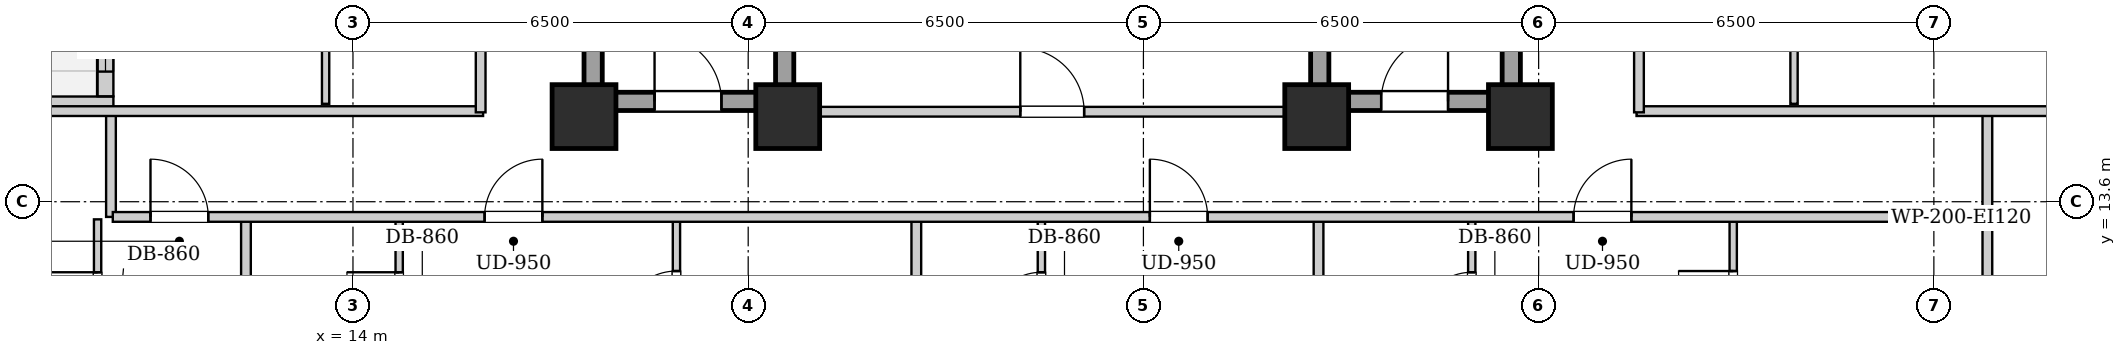
"""IFC4 building model, lengths in metres.
Left out: names, types, materials, properties, quantities, classifications, styles, units other than length and angle.
Written with IfcOpenShell. Run it as: python <this file> out.ifc"""

import sys

from ifc_helpers import new_model, si_unit, direction, frame, frame_2d, origin, origin_2d, place, context, subcontext, project, spatial, rectangle, extrude, element, fill, save


model = new_model("IFC4")
c1 = context("Model", 3, precision=1e-05, world=origin(), true_north=direction((0.0, 1.0)))
c2 = subcontext(c1, "Body", "Model", "MODEL_VIEW")
j1 = project(units=[si_unit("LENGTHUNIT", "METRE"), si_unit("PLANEANGLEUNIT", "RADIAN")], contexts=[c1])
p1 = place(None, origin())
s1 = spatial("IfcSite", under=j1, at=p1, CompositionType="ELEMENT")
p2 = place(p1, origin())
s2 = spatial("IfcBuilding", under=s1, at=p2, CompositionType="ELEMENT")
p3 = place(p2, frame((0.0, 0.0, 91.1)))
s3 = spatial("IfcBuildingStorey", under=s2, at=p3, CompositionType="ELEMENT", Elevation=91.1)
for number, where, z_axis, x_axis in (
    (1, (17.8, 15.0, 0.0), (0.0, 0.0, 1.0), (1.0, 0.0, 0.0)),
    (2, (21.15, 15.0, 0.0), (0.0, 0.0, 1.0), (1.0, 0.0, 0.0)),
    (3, (29.85, 15.0, 0.0), (0.0, 0.0, 1.0), (1.0, 0.0, 0.0)),
    (4, (33.2, 15.0, 0.0), (0.0, 0.0, 1.0), (1.0, 0.0, 0.0)),
):
    element("IfcColumn", number, at=place(p3, frame(where, z_axis=z_axis, x_axis=x_axis)), inside=s3, PredefinedType="COLUMN", context=c2, shape_type="SweptSolid", body=[
        extrude(rectangle(XDim=1.05, YDim=1.05, at=origin_2d()), origin(), (0.0, 0.0, 1.0), 3.2),
    ])
p4 = place(p3, frame((7.66, 15.2, 0.0), z_axis=(0.0, 0.0, 1.0), x_axis=(1.0, 0.0, 0.0)))
e5 = element("IfcWall", 5, at=p4, inside=s3, PredefinedType="SOLIDWALL", context=c2, shape_type="SweptSolid", body=[
    extrude(rectangle(XDim=2.4, YDim=0.26, at=frame_2d((1.2, 0.0))), origin(), (0.0, 0.0, 1.0), 2.94),
])
p5 = place(p3, frame((9.93, 15.334, 0.0), z_axis=(0.0, 0.0, 1.0), x_axis=(0.0, 1.0, 0.0)))
e6 = element("IfcWall", 6, at=p5, inside=s3, PredefinedType="SOLIDWALL", context=c2, shape_type="SweptSolid", body=[
    extrude(rectangle(XDim=3.932, YDim=0.26, at=frame_2d((1.966, 0.0))), origin(), (0.0, 0.0, 1.0), 2.94),
])
p6 = place(p5, frame((1.416, 0.0, 0.0)))
e7 = element("IfcOpeningElement", 7, at=p6, cuts=e6, PredefinedType="OPENING", context=c2, shape_type="SweptSolid", body=[
    extrude(rectangle(XDim=1.1, YDim=2.0, at=frame_2d((0.55, 1.0))), frame((0.0, 0.14, 0.0), z_axis=(0.0, -1.0, 0.0), x_axis=(1.0, 0.0, 0.0)), (0.0, 0.0, 1.0), 0.28),
])
p7 = place(p5, frame((0.406, 0.0, 0.55)))
e8 = element("IfcOpeningElement", 8, at=p7, cuts=e6, PredefinedType="OPENING", context=c2, shape_type="SweptSolid", body=[
    extrude(rectangle(XDim=0.85, YDim=1.2, at=frame_2d((0.425, 0.6))), frame((0.0, 0.14, 0.0), z_axis=(0.0, -1.0, 0.0), x_axis=(1.0, 0.0, 0.0)), (0.0, 0.0, 1.0), 0.28),
])
for number, where, z_axis, x_axis in (
    (9, (17.95, 15.1, 0.0), (0.0, 0.0, 1.0), (0.0, 1.0, 0.0)),
    (10, (21.1, 15.1, 0.0), (0.0, 0.0, 1.0), (0.0, 1.0, 0.0)),
):
    element("IfcWall", number, at=place(p3, frame(where, z_axis=z_axis, x_axis=x_axis)), inside=s3, PredefinedType="SHEAR", context=c2, shape_type="SweptSolid", body=[
        extrude(rectangle(XDim=9.0, YDim=0.3, at=frame_2d((4.5, 0.0))), origin(), (0.0, 0.0, 1.0), 2.94),
    ])
p8 = place(p3, frame((18.1, 15.25, 0.0), z_axis=(0.0, 0.0, 1.0), x_axis=(1.0, 0.0, 0.0)))
e11 = element("IfcWall", 11, at=p8, inside=s3, PredefinedType="SHEAR", context=c2, shape_type="SweptSolid", body=[
    extrude(rectangle(XDim=2.85, YDim=0.3, at=frame_2d((1.425, 0.0))), origin(), (0.0, 0.0, 1.0), 2.94),
])
p9 = place(p8, frame((0.86, 0.0, 0.0)))
e12 = element("IfcOpeningElement", 12, at=p9, cuts=e11, PredefinedType="OPENING", context=c2, shape_type="SweptSolid", body=[
    extrude(rectangle(XDim=1.1, YDim=2.05, at=frame_2d((0.55, 1.025))), frame((0.0, 0.16, 0.0), z_axis=(0.0, -1.0, 0.0), x_axis=(1.0, 0.0, 0.0)), (0.0, 0.0, 1.0), 0.32),
])
for number, where, z_axis, x_axis in (
    (13, (29.9, 15.1, 0.0), (0.0, 0.0, 1.0), (0.0, 1.0, 0.0)),
    (14, (33.05, 15.1, 0.0), (0.0, 0.0, 1.0), (0.0, 1.0, 0.0)),
):
    element("IfcWall", number, at=place(p3, frame(where, z_axis=z_axis, x_axis=x_axis)), inside=s3, PredefinedType="SHEAR", context=c2, shape_type="SweptSolid", body=[
        extrude(rectangle(XDim=9.0, YDim=0.3, at=frame_2d((4.5, 0.0))), origin(), (0.0, 0.0, 1.0), 2.94),
    ])
p10 = place(p3, frame((30.05, 15.25, 0.0), z_axis=(0.0, 0.0, 1.0), x_axis=(1.0, 0.0, 0.0)))
e15 = element("IfcWall", 15, at=p10, inside=s3, PredefinedType="SHEAR", context=c2, shape_type="SweptSolid", body=[
    extrude(rectangle(XDim=2.85, YDim=0.3, at=frame_2d((1.425, 0.0))), origin(), (0.0, 0.0, 1.0), 2.94),
])
p11 = place(p10, frame((0.86, 0.0, 0.0)))
e16 = element("IfcOpeningElement", 16, at=p11, cuts=e15, PredefinedType="OPENING", context=c2, shape_type="SweptSolid", body=[
    extrude(rectangle(XDim=1.1, YDim=2.05, at=frame_2d((0.55, 1.025))), frame((0.0, 0.16, 0.0), z_axis=(0.0, -1.0, 0.0), x_axis=(1.0, 0.0, 0.0)), (0.0, 0.0, 1.0), 0.32),
])
p12 = place(p3, frame((21.25, 15.08, 0.0), z_axis=(0.0, 0.0, 1.0), x_axis=(1.0, 0.0, 0.0)))
e17 = element("IfcWall", 17, at=p12, inside=s3, PredefinedType="PARTITIONING", context=c2, shape_type="SweptSolid", body=[
    extrude(rectangle(XDim=8.5, YDim=0.16, at=frame_2d((4.25, 0.0))), origin(), (0.0, 0.0, 1.0), 2.309),
])
p13 = place(p12, frame((3.725, 0.0, 0.0)))
e18 = element("IfcOpeningElement", 18, at=p13, cuts=e17, PredefinedType="OPENING", context=c2, shape_type="SweptSolid", body=[
    extrude(rectangle(XDim=1.05, YDim=2.05, at=frame_2d((0.525, 1.025))), frame((0.0, 0.09, 0.0), z_axis=(0.0, -1.0, 0.0), x_axis=(1.0, 0.0, 0.0)), (0.0, 0.0, 1.0), 0.18),
])
for number, where, z_axis, x_axis in (
    (19, (10.02, 13.35, 0.0), (0.0, 0.0, 1.0), (0.0, 1.0, 0.0)),
    (20, (40.88, 13.35, 0.0), (0.0, 0.0, 1.0), (0.0, 1.0, 0.0)),
):
    element("IfcWall", number, at=place(p3, frame(where, z_axis=z_axis, x_axis=x_axis)), inside=s3, PredefinedType="PARTITIONING", context=c2, shape_type="SweptSolid", body=[
        extrude(rectangle(XDim=1.74, YDim=0.16, at=frame_2d((0.87, 0.0))), origin(), (0.0, 0.0, 1.0), 2.94),
    ])
p14 = place(p3, frame((7.78, 15.09, 0.0), z_axis=(0.0, 0.0, 1.0), x_axis=(1.0, 0.0, 0.0)))
e21 = element("IfcWall", 21, at=p14, inside=s3, PredefinedType="PARTITIONING", context=c2, shape_type="SweptSolid", body=[
    extrude(rectangle(XDim=8.36, YDim=0.16, at=frame_2d((4.18, 0.0))), origin(), (0.0, 0.0, 1.0), 2.309),
])
p15 = place(p3, frame((35.11, 15.09, 0.0), z_axis=(0.0, 0.0, 1.0), x_axis=(1.0, 0.0, 0.0)))
e22 = element("IfcWall", 22, at=p15, inside=s3, PredefinedType="PARTITIONING", context=c2, shape_type="SweptSolid", body=[
    extrude(rectangle(XDim=8.01, YDim=0.16, at=frame_2d((4.005, 0.0))), origin(), (0.0, 0.0, 1.0), 2.309),
])
p16 = place(p3, frame((9.8, 10.71, 0.0), z_axis=(0.0, 0.0, 1.0), x_axis=(0.0, 1.0, 0.0)))
e23 = element("IfcWall", 23, at=p16, inside=s3, PredefinedType="PARTITIONING", context=c2, shape_type="SweptSolid", body=[
    extrude(rectangle(XDim=2.6, YDim=0.12, at=frame_2d((1.3, 0.0))), origin(), (0.0, 0.0, 1.0), 2.94),
])
p17 = place(p16, frame((0.87, 0.0, 0.0)))
e24 = element("IfcOpeningElement", 24, at=p17, cuts=e23, PredefinedType="OPENING", context=c2, shape_type="SweptSolid", body=[
    extrude(rectangle(XDim=0.86, YDim=2.05, at=frame_2d((0.43, 1.025))), frame((0.0, 0.07, 0.0), z_axis=(0.0, -1.0, 0.0), x_axis=(1.0, 0.0, 0.0)), (0.0, 0.0, 1.0), 0.14),
])
p18 = place(p3, frame((12.24, 2.26, 0.0), z_axis=(0.0, 0.0, 1.0), x_axis=(0.0, 1.0, 0.0)))
e25 = element("IfcWall", 25, at=p18, inside=s3, PredefinedType="PARTITIONING", context=c2, shape_type="SweptSolid", body=[
    extrude(rectangle(XDim=11.05, YDim=0.16, at=frame_2d((5.525, 0.0))), origin(), (0.0, 0.0, 1.0), 2.94),
])
p19 = place(p3, frame((14.76, 10.71, 0.0), z_axis=(0.0, 0.0, 1.0), x_axis=(0.0, 1.0, 0.0)))
e26 = element("IfcWall", 26, at=p19, inside=s3, PredefinedType="PARTITIONING", context=c2, shape_type="SweptSolid", body=[
    extrude(rectangle(XDim=2.6, YDim=0.12, at=frame_2d((1.3, 0.0))), origin(), (0.0, 0.0, 1.0), 2.94),
])
p20 = place(p19, frame((0.87, 0.0, 0.0)))
e27 = element("IfcOpeningElement", 27, at=p20, cuts=e26, PredefinedType="OPENING", context=c2, shape_type="SweptSolid", body=[
    extrude(rectangle(XDim=0.86, YDim=2.05, at=frame_2d((0.43, 1.025))), frame((0.0, 0.07, 0.0), z_axis=(0.0, -1.0, 0.0), x_axis=(1.0, 0.0, 0.0)), (0.0, 0.0, 1.0), 0.14),
])
p21 = place(p3, frame((19.32, 10.71, 0.0), z_axis=(0.0, 0.0, 1.0), x_axis=(0.0, 1.0, 0.0)))
e28 = element("IfcWall", 28, at=p21, inside=s3, PredefinedType="PARTITIONING", context=c2, shape_type="SweptSolid", body=[
    extrude(rectangle(XDim=2.6, YDim=0.12, at=frame_2d((1.3, 0.0))), origin(), (0.0, 0.0, 1.0), 2.94),
])
p22 = place(p21, frame((0.85, 0.0, 0.0)))
e29 = element("IfcOpeningElement", 29, at=p22, cuts=e28, PredefinedType="OPENING", context=c2, shape_type="SweptSolid", body=[
    extrude(rectangle(XDim=0.9, YDim=2.05, at=frame_2d((0.45, 1.025))), frame((0.0, 0.07, 0.0), z_axis=(0.0, -1.0, 0.0), x_axis=(1.0, 0.0, 0.0)), (0.0, 0.0, 1.0), 0.14),
])
p23 = place(p3, frame((23.265, 0.28, 0.0), z_axis=(0.0, 0.0, 1.0), x_axis=(0.0, 1.0, 0.0)))
e30 = element("IfcWall", 30, at=p23, inside=s3, PredefinedType="PARTITIONING", context=c2, shape_type="SweptSolid", body=[
    extrude(rectangle(XDim=13.03, YDim=0.16, at=frame_2d((6.515, 0.0))), origin(), (0.0, 0.0, 1.0), 2.94),
])
p24 = place(p3, frame((25.322, 10.71, 0.0), z_axis=(0.0, 0.0, 1.0), x_axis=(0.0, 1.0, 0.0)))
e31 = element("IfcWall", 31, at=p24, inside=s3, PredefinedType="PARTITIONING", context=c2, shape_type="SweptSolid", body=[
    extrude(rectangle(XDim=2.6, YDim=0.12, at=frame_2d((1.3, 0.0))), origin(), (0.0, 0.0, 1.0), 2.94),
])
p25 = place(p24, frame((0.87, 0.0, 0.0)))
e32 = element("IfcOpeningElement", 32, at=p25, cuts=e31, PredefinedType="OPENING", context=c2, shape_type="SweptSolid", body=[
    extrude(rectangle(XDim=0.86, YDim=2.05, at=frame_2d((0.43, 1.025))), frame((0.0, 0.07, 0.0), z_axis=(0.0, -1.0, 0.0), x_axis=(1.0, 0.0, 0.0)), (0.0, 0.0, 1.0), 0.14),
])
p26 = place(p3, frame((40.88, 10.65, 0.0), z_axis=(0.0, 0.0, 1.0), x_axis=(0.0, 1.0, 0.0)))
e33 = element("IfcWall", 33, at=p26, inside=s3, PredefinedType="PARTITIONING", context=c2, shape_type="SweptSolid", body=[
    extrude(rectangle(XDim=2.66, YDim=0.16, at=frame_2d((1.33, 0.0))), origin(), (0.0, 0.0, 1.0), 2.94),
])
p27 = place(p3, frame((29.88, 0.28, 0.0), z_axis=(0.0, 0.0, 1.0), x_axis=(0.0, 1.0, 0.0)))
e34 = element("IfcWall", 34, at=p27, inside=s3, PredefinedType="PARTITIONING", context=c2, shape_type="SweptSolid", body=[
    extrude(rectangle(XDim=13.03, YDim=0.16, at=frame_2d((6.515, 0.0))), origin(), (0.0, 0.0, 1.0), 2.94),
])
p28 = place(p3, frame((32.4, 10.71, 0.0), z_axis=(0.0, 0.0, 1.0), x_axis=(0.0, 1.0, 0.0)))
e35 = element("IfcWall", 35, at=p28, inside=s3, PredefinedType="PARTITIONING", context=c2, shape_type="SweptSolid", body=[
    extrude(rectangle(XDim=2.6, YDim=0.12, at=frame_2d((1.3, 0.0))), origin(), (0.0, 0.0, 1.0), 2.94),
])
p29 = place(p28, frame((0.87, 0.0, 0.0)))
e36 = element("IfcOpeningElement", 36, at=p29, cuts=e35, PredefinedType="OPENING", context=c2, shape_type="SweptSolid", body=[
    extrude(rectangle(XDim=0.86, YDim=2.05, at=frame_2d((0.43, 1.025))), frame((0.0, 0.07, 0.0), z_axis=(0.0, -1.0, 0.0), x_axis=(1.0, 0.0, 0.0)), (0.0, 0.0, 1.0), 0.14),
])
p30 = place(p3, frame((36.7, 10.71, 0.0), z_axis=(0.0, 0.0, 1.0), x_axis=(0.0, 1.0, 0.0)))
e37 = element("IfcWall", 37, at=p30, inside=s3, PredefinedType="PARTITIONING", context=c2, shape_type="SweptSolid", body=[
    extrude(rectangle(XDim=2.6, YDim=0.12, at=frame_2d((1.3, 0.0))), origin(), (0.0, 0.0, 1.0), 2.94),
])
p31 = place(p30, frame((0.85, 0.0, 0.0)))
e38 = element("IfcOpeningElement", 38, at=p31, cuts=e37, PredefinedType="OPENING", context=c2, shape_type="SweptSolid", body=[
    extrude(rectangle(XDim=0.9, YDim=2.05, at=frame_2d((0.45, 1.025))), frame((0.0, 0.07, 0.0), z_axis=(0.0, -1.0, 0.0), x_axis=(1.0, 0.0, 0.0)), (0.0, 0.0, 1.0), 0.14),
])
for number, where, z_axis, x_axis in (
    (39, (13.55, 15.21, 0.0), (0.0, 0.0, 1.0), (0.0, 1.0, 0.0)),
    (40, (37.7, 15.21, 0.0), (0.0, 0.0, 1.0), (0.0, 1.0, 0.0)),
):
    element("IfcWall", number, at=place(p3, frame(where, z_axis=z_axis, x_axis=x_axis)), inside=s3, PredefinedType="PARTITIONING", context=c2, shape_type="SweptSolid", body=[
        extrude(rectangle(XDim=1.85, YDim=0.12, at=frame_2d((0.925, 0.0))), origin(), (0.0, 0.0, 1.0), 2.94),
    ])
p32 = place(p3, frame((10.05, 13.35, 0.0), z_axis=(0.0, 0.0, 1.0), x_axis=(1.0, 0.0, 0.0)))
e41 = element("IfcWall", 41, at=p32, inside=s3, PredefinedType="PARTITIONING", context=c2, shape_type="SweptSolid", body=[
    extrude(rectangle(XDim=30.8, YDim=0.16, at=frame_2d((15.4, 0.0))), origin(), (0.0, 0.0, 1.0), 2.94),
])
p33 = place(p32, frame((0.62, 0.0, 0.0)))
e42 = element("IfcOpeningElement", 42, at=p33, cuts=e41, PredefinedType="OPENING", context=c2, shape_type="SweptSolid", body=[
    extrude(rectangle(XDim=0.95, YDim=2.1, at=frame_2d((0.475, 1.05))), frame((0.0, 0.09, 0.0), z_axis=(0.0, -1.0, 0.0), x_axis=(1.0, 0.0, 0.0)), (0.0, 0.0, 1.0), 0.18),
])
p34 = place(p32, frame((6.115, 0.0, 0.0)))
e43 = element("IfcOpeningElement", 43, at=p34, cuts=e41, PredefinedType="OPENING", context=c2, shape_type="SweptSolid", body=[
    extrude(rectangle(XDim=0.95, YDim=2.1, at=frame_2d((0.475, 1.05))), frame((0.0, 0.09, 0.0), z_axis=(0.0, -1.0, 0.0), x_axis=(1.0, 0.0, 0.0)), (0.0, 0.0, 1.0), 0.18),
])
p35 = place(p32, frame((17.056, 0.0, 0.0)))
e44 = element("IfcOpeningElement", 44, at=p35, cuts=e41, PredefinedType="OPENING", context=c2, shape_type="SweptSolid", body=[
    extrude(rectangle(XDim=0.95, YDim=2.1, at=frame_2d((0.475, 1.05))), frame((0.0, 0.09, 0.0), z_axis=(0.0, -1.0, 0.0), x_axis=(1.0, 0.0, 0.0)), (0.0, 0.0, 1.0), 0.18),
])
p36 = place(p32, frame((24.025, 0.0, 0.0)))
e45 = element("IfcOpeningElement", 45, at=p36, cuts=e41, PredefinedType="OPENING", context=c2, shape_type="SweptSolid", body=[
    extrude(rectangle(XDim=0.95, YDim=2.1, at=frame_2d((0.475, 1.05))), frame((0.0, 0.09, 0.0), z_axis=(0.0, -1.0, 0.0), x_axis=(1.0, 0.0, 0.0)), (0.0, 0.0, 1.0), 0.18),
])
p37 = place(p3, frame((16.1, 15.07, 0.0), z_axis=(0.0, 0.0, 1.0), x_axis=(0.0, 1.0, 0.0)))
e46 = element("IfcWall", 46, at=p37, inside=s3, PredefinedType="PARTITIONING", context=c2, shape_type="SweptSolid", body=[
    extrude(rectangle(XDim=13.93, YDim=0.16, at=frame_2d((6.965, 0.0))), origin(), (0.0, 0.0, 1.0), 2.94),
])
p38 = place(p37, frame((3.608, 0.0, 0.0)))
e47 = element("IfcOpeningElement", 47, at=p38, cuts=e46, PredefinedType="OPENING", context=c2, shape_type="SweptSolid", body=[
    extrude(rectangle(XDim=0.95, YDim=2.1, at=frame_2d((0.475, 1.05))), frame((0.0, 0.09, 0.0), z_axis=(0.0, -1.0, 0.0), x_axis=(1.0, 0.0, 0.0)), (0.0, 0.0, 1.0), 0.18),
])
p39 = place(p37, frame((10.649, 0.0, 0.0)))
e48 = element("IfcOpeningElement", 48, at=p39, cuts=e46, PredefinedType="OPENING", context=c2, shape_type="SweptSolid", body=[
    extrude(rectangle(XDim=0.95, YDim=2.1, at=frame_2d((0.475, 1.05))), frame((0.0, 0.09, 0.0), z_axis=(0.0, -1.0, 0.0), x_axis=(1.0, 0.0, 0.0)), (0.0, 0.0, 1.0), 0.18),
])
p40 = place(p3, frame((35.15, 15.07, 0.0), z_axis=(0.0, 0.0, 1.0), x_axis=(0.0, 1.0, 0.0)))
e49 = element("IfcWall", 49, at=p40, inside=s3, PredefinedType="PARTITIONING", context=c2, shape_type="SweptSolid", body=[
    extrude(rectangle(XDim=13.93, YDim=0.16, at=frame_2d((6.965, 0.0))), origin(), (0.0, 0.0, 1.0), 2.94),
])
p41 = place(p40, frame((3.608, 0.0, 0.0)))
e50 = element("IfcOpeningElement", 50, at=p41, cuts=e49, PredefinedType="OPENING", context=c2, shape_type="SweptSolid", body=[
    extrude(rectangle(XDim=0.95, YDim=2.1, at=frame_2d((0.475, 1.05))), frame((0.0, 0.09, 0.0), z_axis=(0.0, -1.0, 0.0), x_axis=(1.0, 0.0, 0.0)), (0.0, 0.0, 1.0), 0.18),
])
p42 = place(p40, frame((10.649, 0.0, 0.0)))
e51 = element("IfcOpeningElement", 51, at=p42, cuts=e49, PredefinedType="OPENING", context=c2, shape_type="SweptSolid", body=[
    extrude(rectangle(XDim=0.95, YDim=2.1, at=frame_2d((0.475, 1.05))), frame((0.0, 0.09, 0.0), z_axis=(0.0, -1.0, 0.0), x_axis=(1.0, 0.0, 0.0)), (0.0, 0.0, 1.0), 0.18),
])
p43 = place(p9, origin())
e52 = element("IfcDoor", 52, at=p43, inside=s3, OperationType="SINGLE_SWING_LEFT", PredefinedType="DOOR", context=c2, shape_type="SweptSolid", body=[
    extrude(rectangle(XDim=1.1, YDim=2.05, at=frame_2d((0.55, 1.025))), frame((0.0, 0.025, 0.0), z_axis=(0.0, -1.0, 0.0), x_axis=(1.0, 0.0, 0.0)), (0.0, 0.0, 1.0), 0.05),
])
fill(e12, e52)
p44 = place(p11, origin())
e53 = element("IfcDoor", 53, at=p44, inside=s3, OperationType="SINGLE_SWING_RIGHT", PredefinedType="DOOR", context=c2, shape_type="SweptSolid", body=[
    extrude(rectangle(XDim=1.1, YDim=2.05, at=frame_2d((0.55, 1.025))), frame((0.0, 0.025, 0.0), z_axis=(0.0, -1.0, 0.0), x_axis=(1.0, 0.0, 0.0)), (0.0, 0.0, 1.0), 0.05),
])
fill(e16, e53)
p45 = place(p13, origin())
e54 = element("IfcDoor", 54, at=p45, inside=s3, OperationType="SINGLE_SWING_LEFT", PredefinedType="DOOR", context=c2, shape_type="SweptSolid", body=[
    extrude(rectangle(XDim=1.05, YDim=2.05, at=frame_2d((0.525, 1.025))), frame((0.0, 0.025, 0.0), z_axis=(0.0, -1.0, 0.0), x_axis=(1.0, 0.0, 0.0)), (0.0, 0.0, 1.0), 0.05),
])
fill(e18, e54)
p46 = place(p17, origin())
e55 = element("IfcDoor", 55, at=p46, inside=s3, OperationType="SINGLE_SWING_RIGHT", PredefinedType="DOOR", context=c2, shape_type="SweptSolid", body=[
    extrude(rectangle(XDim=0.86, YDim=2.05, at=frame_2d((0.43, 1.025))), frame((0.0, 0.025, 0.0), z_axis=(0.0, -1.0, 0.0), x_axis=(1.0, 0.0, 0.0)), (0.0, 0.0, 1.0), 0.05),
])
fill(e24, e55)
p47 = place(p20, origin())
e56 = element("IfcDoor", 56, at=p47, inside=s3, OperationType="SINGLE_SWING_RIGHT", PredefinedType="DOOR", context=c2, shape_type="SweptSolid", body=[
    extrude(rectangle(XDim=0.86, YDim=2.05, at=frame_2d((0.43, 1.025))), frame((0.0, 0.025, 0.0), z_axis=(0.0, -1.0, 0.0), x_axis=(1.0, 0.0, 0.0)), (0.0, 0.0, 1.0), 0.05),
])
fill(e27, e56)
p48 = place(p22, origin())
e57 = element("IfcDoor", 57, at=p48, inside=s3, OperationType="SINGLE_SWING_LEFT", PredefinedType="DOOR", context=c2, shape_type="SweptSolid", body=[
    extrude(rectangle(XDim=0.9, YDim=2.05, at=frame_2d((0.45, 1.025))), frame((0.0, 0.025, 0.0), z_axis=(0.0, -1.0, 0.0), x_axis=(1.0, 0.0, 0.0)), (0.0, 0.0, 1.0), 0.05),
])
fill(e29, e57)
p49 = place(p25, origin())
e58 = element("IfcDoor", 58, at=p49, inside=s3, OperationType="SINGLE_SWING_LEFT", PredefinedType="DOOR", context=c2, shape_type="SweptSolid", body=[
    extrude(rectangle(XDim=0.86, YDim=2.05, at=frame_2d((0.43, 1.025))), frame((0.0, 0.025, 0.0), z_axis=(0.0, -1.0, 0.0), x_axis=(1.0, 0.0, 0.0)), (0.0, 0.0, 1.0), 0.05),
])
fill(e32, e58)
p50 = place(p29, origin())
e59 = element("IfcDoor", 59, at=p50, inside=s3, OperationType="SINGLE_SWING_LEFT", PredefinedType="DOOR", context=c2, shape_type="SweptSolid", body=[
    extrude(rectangle(XDim=0.86, YDim=2.05, at=frame_2d((0.43, 1.025))), frame((0.0, 0.025, 0.0), z_axis=(0.0, -1.0, 0.0), x_axis=(1.0, 0.0, 0.0)), (0.0, 0.0, 1.0), 0.05),
])
fill(e36, e59)
p51 = place(p31, origin())
e60 = element("IfcDoor", 60, at=p51, inside=s3, OperationType="SINGLE_SWING_RIGHT", PredefinedType="DOOR", context=c2, shape_type="SweptSolid", body=[
    extrude(rectangle(XDim=0.9, YDim=2.05, at=frame_2d((0.45, 1.025))), frame((0.0, 0.025, 0.0), z_axis=(0.0, -1.0, 0.0), x_axis=(1.0, 0.0, 0.0)), (0.0, 0.0, 1.0), 0.05),
])
fill(e38, e60)
p52 = place(p33, origin())
e61 = element("IfcDoor", 61, at=p52, inside=s3, OperationType="SINGLE_SWING_LEFT", PredefinedType="DOOR", context=c2, shape_type="SweptSolid", body=[
    extrude(rectangle(XDim=0.95, YDim=2.1, at=frame_2d((0.475, 1.05))), frame((0.0, 0.025, 0.0), z_axis=(0.0, -1.0, 0.0), x_axis=(1.0, 0.0, 0.0)), (0.0, 0.0, 1.0), 0.05),
])
fill(e42, e61)
p53 = place(p34, origin())
e62 = element("IfcDoor", 62, at=p53, inside=s3, OperationType="SINGLE_SWING_RIGHT", PredefinedType="DOOR", context=c2, shape_type="SweptSolid", body=[
    extrude(rectangle(XDim=0.95, YDim=2.1, at=frame_2d((0.475, 1.05))), frame((0.0, 0.025, 0.0), z_axis=(0.0, -1.0, 0.0), x_axis=(1.0, 0.0, 0.0)), (0.0, 0.0, 1.0), 0.05),
])
fill(e43, e62)
p54 = place(p35, origin())
e63 = element("IfcDoor", 63, at=p54, inside=s3, OperationType="SINGLE_SWING_LEFT", PredefinedType="DOOR", context=c2, shape_type="SweptSolid", body=[
    extrude(rectangle(XDim=0.95, YDim=2.1, at=frame_2d((0.475, 1.05))), frame((0.0, 0.025, 0.0), z_axis=(0.0, -1.0, 0.0), x_axis=(1.0, 0.0, 0.0)), (0.0, 0.0, 1.0), 0.05),
])
fill(e44, e63)
p55 = place(p36, origin())
e64 = element("IfcDoor", 64, at=p55, inside=s3, OperationType="SINGLE_SWING_RIGHT", PredefinedType="DOOR", context=c2, shape_type="SweptSolid", body=[
    extrude(rectangle(XDim=0.95, YDim=2.1, at=frame_2d((0.475, 1.05))), frame((0.0, 0.025, 0.0), z_axis=(0.0, -1.0, 0.0), x_axis=(1.0, 0.0, 0.0)), (0.0, 0.0, 1.0), 0.05),
])
fill(e45, e64)
p56 = place(p7, origin())
e65 = element("IfcWindow", 65, at=p56, inside=s3, PartitioningType="SINGLE_PANEL", PredefinedType="WINDOW", context=c2, shape_type="SweptSolid", body=[
    extrude(rectangle(XDim=0.85, YDim=1.2, at=frame_2d((0.425, 0.6))), frame((0.0, 0.03, 0.0), z_axis=(0.0, -1.0, 0.0), x_axis=(1.0, 0.0, 0.0)), (0.0, 0.0, 1.0), 0.06),
])
fill(e8, e65)
save(model, sys.argv[1])
